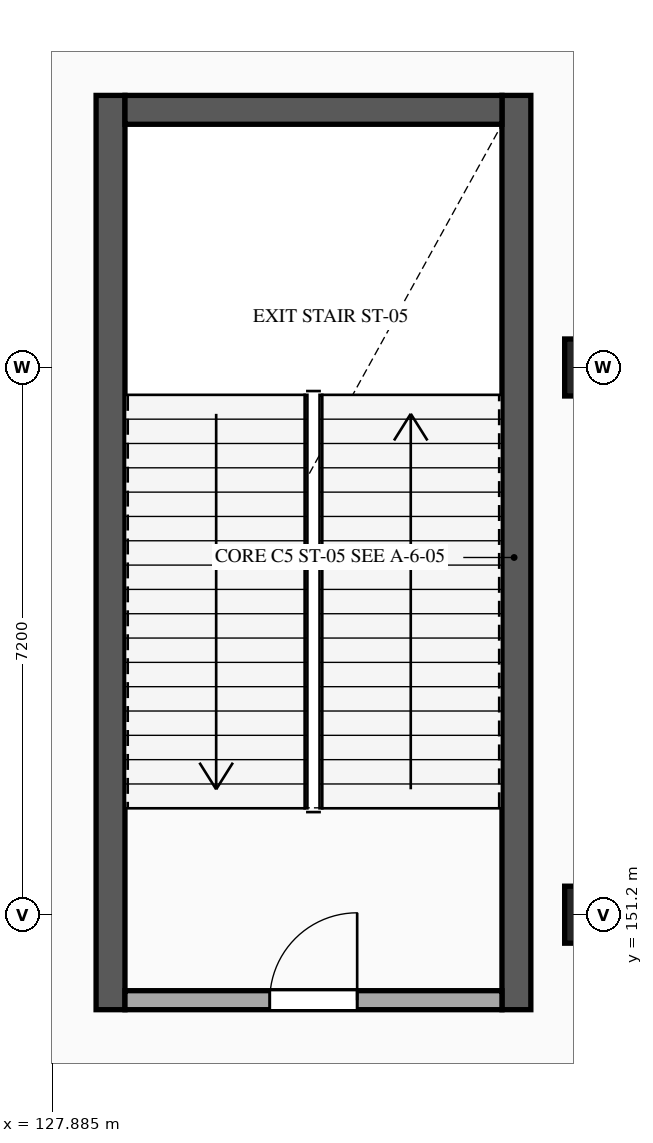
"""IFC4 building model, lengths in metres.
Left out: names, types, materials, properties, quantities, classifications, styles, units other than length and angle.
Written with IfcOpenShell. Run it as: python <this file> out.ifc"""

import sys

from ifc_helpers import new_model, si_unit, direction, frame, frame_2d, origin, origin_2d, place, context, subcontext, project, spatial, rectangle, extrude, element, fill, save


model = new_model("IFC4")
c1 = context("Model", 3, precision=1e-05, world=origin(), true_north=direction((0.0, 1.0)))
c2 = subcontext(c1, "Body", "Model", "MODEL_VIEW")
j1 = project(units=[si_unit("LENGTHUNIT", "METRE"), si_unit("PLANEANGLEUNIT", "RADIAN")], contexts=[c1])
p1 = place(None, origin())
s1 = spatial("IfcSite", under=j1, at=p1, CompositionType="ELEMENT")
p2 = place(p1, origin())
s2 = spatial("IfcBuilding", under=s1, at=p2, CompositionType="ELEMENT")
p3 = place(p2, frame((0.0, 0.0, 5.4)))
s3 = spatial("IfcBuildingStorey", under=s2, at=p3, CompositionType="ELEMENT", Elevation=5.4)
for number, where, z_axis, x_axis in (
    (1, (135.0, 151.2, 0.0), (0.0, 0.0, 1.0), (1.0, 0.0, 0.0)),
    (2, (135.0, 158.4, 0.0), (0.0, 0.0, 1.0), (1.0, 0.0, 0.0)),
):
    element("IfcColumn", number, at=place(p3, frame(where, z_axis=z_axis, x_axis=x_axis)), inside=s3, PredefinedType="COLUMN", context=c2, shape_type="SweptSolid", body=[
        extrude(rectangle(XDim=0.75, YDim=0.75, at=origin_2d()), origin(), (0.0, 0.0, 1.0), 5.4),
    ])
for number, where, z_axis, x_axis in (
    (3, (128.65, 149.95, 0.0), (0.0, 0.0, 1.0), (0.0, 1.0, 0.0)),
    (4, (133.99, 161.98, 0.0), (0.0, 0.0, 1.0), (0.0, -1.0, 0.0)),
):
    element("IfcWall", number, at=place(p3, frame(where, z_axis=z_axis, x_axis=x_axis)), inside=s3, PredefinedType="SHEAR", context=c2, shape_type="SweptSolid", body=[
        extrude(rectangle(XDim=12.03, YDim=0.38, at=frame_2d((6.015, 0.0))), origin(), (0.0, 0.0, 1.0), 5.12),
    ])
p4 = place(p3, frame((128.84, 161.79, 0.0), z_axis=(0.0, 0.0, 1.0), x_axis=(1.0, 0.0, 0.0)))
e5 = element("IfcWall", 5, at=p4, inside=s3, PredefinedType="SHEAR", context=c2, shape_type="SweptSolid", body=[
    extrude(rectangle(XDim=4.96, YDim=0.38, at=frame_2d((2.48, 0.0))), origin(), (0.0, 0.0, 1.0), 5.12),
])
p5 = place(p3, frame((128.84, 150.075, 0.0), z_axis=(0.0, 0.0, 1.0), x_axis=(1.0, 0.0, 0.0)))
e6 = element("IfcWall", 6, at=p5, inside=s3, PredefinedType="STANDARD", context=c2, shape_type="SweptSolid", body=[
    extrude(rectangle(XDim=4.96, YDim=0.25, at=frame_2d((2.48, 0.0))), origin(), (0.0, 0.0, 1.0), 5.12),
])
p6 = place(p5, frame((1.905, 0.0, 0.0)))
e7 = element("IfcOpeningElement", 7, at=p6, cuts=e6, PredefinedType="OPENING", context=c2, shape_type="SweptSolid", body=[
    extrude(rectangle(XDim=1.15, YDim=2.2, at=frame_2d((0.575, 1.1))), frame((0.0, 0.135, 0.0), z_axis=(0.0, -1.0, 0.0), x_axis=(1.0, 0.0, 0.0)), (0.0, 0.0, 1.0), 0.27),
])
p7 = place(p6, origin())
e8 = element("IfcDoor", 8, at=p7, inside=s3, OperationType="SINGLE_SWING_RIGHT", PredefinedType="DOOR", context=c2, shape_type="SweptSolid", body=[
    extrude(rectangle(XDim=1.15, YDim=2.2, at=frame_2d((0.575, 1.1))), frame((0.0, 0.025, 0.0), z_axis=(0.0, -1.0, 0.0), x_axis=(1.0, 0.0, 0.0)), (0.0, 0.0, 1.0), 0.05),
])
fill(e7, e8)
save(model, sys.argv[1])
